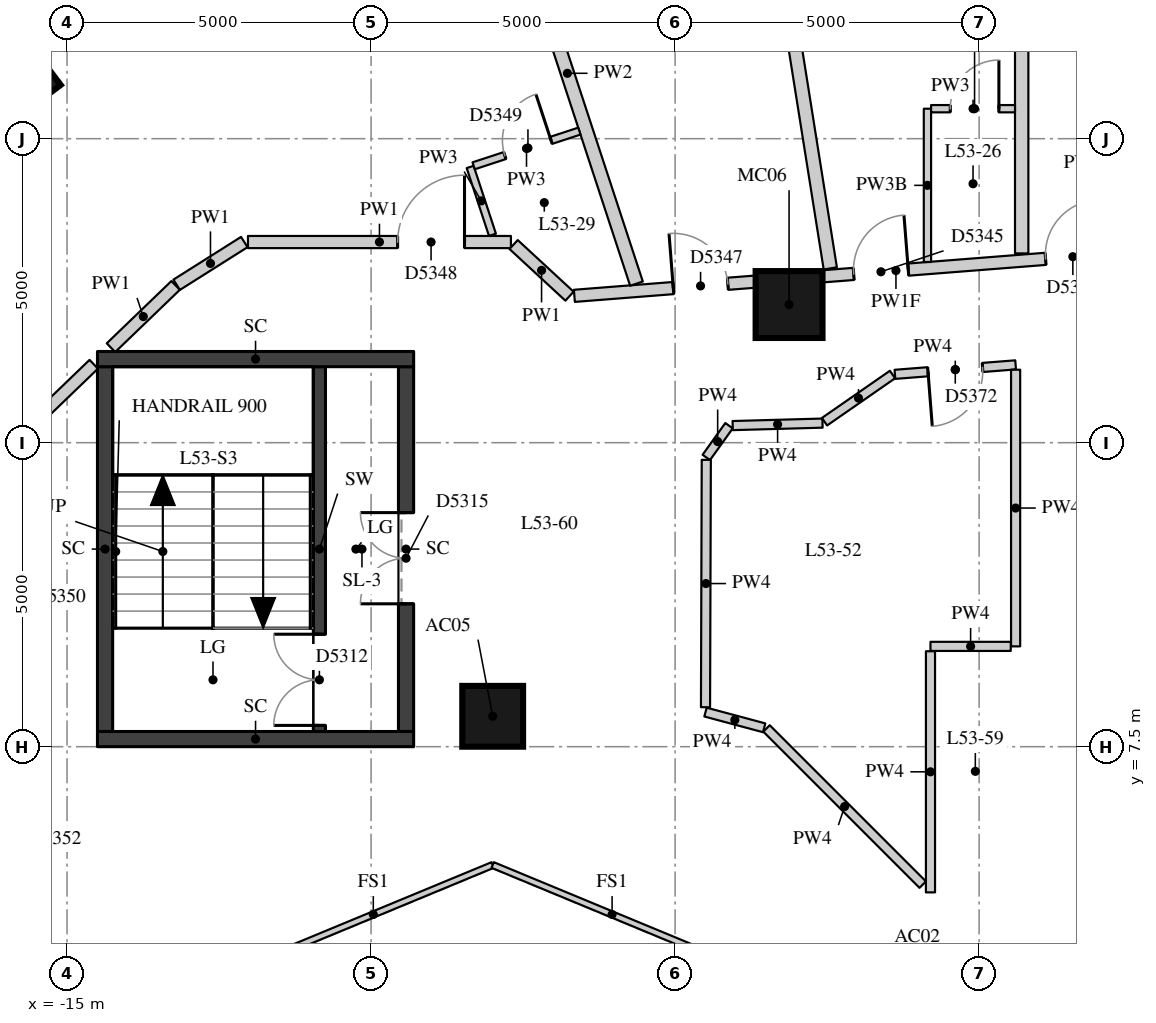
"""IFC4 building model, lengths in metres.
Left out: names, types, materials, properties, quantities, classifications, styles, units other than length and angle.
Written with IfcOpenShell. Run it as: python <this file> out.ifc"""

import sys

from ifc_helpers import new_model, si_unit, direction, frame, frame_2d, origin, origin_2d, place, context, subcontext, project, spatial, rectangle, extrude, element, fill, save


model = new_model("IFC4")
c1 = context("Model", 3, precision=1e-05, world=origin(), true_north=direction((0.0, 1.0)))
c2 = subcontext(c1, "Body", "Model", "MODEL_VIEW")
j1 = project(units=[si_unit("LENGTHUNIT", "METRE"), si_unit("PLANEANGLEUNIT", "RADIAN")], contexts=[c1])
p1 = place(None, origin())
s1 = spatial("IfcSite", under=j1, at=p1, CompositionType="ELEMENT")
p2 = place(p1, origin())
s2 = spatial("IfcBuilding", under=s1, at=p2, CompositionType="ELEMENT")
p3 = place(p2, frame((0.0, 0.0, 189.2)))
s3 = spatial("IfcBuildingStorey", under=s2, at=p3, CompositionType="ELEMENT", Elevation=189.2)
p4 = place(p3, frame((-15.916, 18.71, 0.0), z_axis=(0.0, 0.0, 1.0), x_axis=(-0.60360770772, 0.797281465469, 0.0)))
e1 = element("IfcColumn", 1, at=p4, inside=s3, PredefinedType="COLUMN", context=c2, shape_type="SweptSolid", body=[
    extrude(rectangle(XDim=1.5, YDim=0.9, at=origin_2d()), origin(), (0.0, 0.0, 1.0), 3.3),
])
p5 = place(p3, frame((-8.0, 8.0, 0.0), z_axis=(0.0, 0.0, 1.0), x_axis=(1.0, 0.0, 0.0)))
e2 = element("IfcColumn", 2, at=p5, inside=s3, PredefinedType="COLUMN", context=c2, shape_type="SweptSolid", body=[
    extrude(rectangle(XDim=1.0, YDim=1.0, at=origin_2d()), origin(), (0.0, 0.0, 1.0), 3.3),
])
p6 = place(p3, frame((-3.126, 14.772, 0.0), z_axis=(0.0, 0.0, 1.0), x_axis=(1.0, 0.0, 0.0)))
e3 = element("IfcColumn", 3, at=p6, inside=s3, PredefinedType="COLUMN", context=c2, shape_type="SweptSolid", body=[
    extrude(rectangle(XDim=1.1, YDim=1.1, at=origin_2d()), origin(), (0.0, 0.0, 1.0), 3.3),
])
p7 = place(p3, frame((-10.85, 7.75, 0.0), z_axis=(0.0, 0.0, 1.0), x_axis=(0.0, 1.0, 0.0)))
e4 = element("IfcWall", 4, at=p7, inside=s3, PredefinedType="SHEAR", context=c2, shape_type="SweptSolid", body=[
    extrude(rectangle(XDim=6.0, YDim=0.2, at=frame_2d((3.0, 0.0))), origin(), (0.0, 0.0, 1.0), 3.02),
])
p8 = place(p7, frame((0.1, 0.0, 0.0)))
e5 = element("IfcOpeningElement", 5, at=p8, cuts=e4, PredefinedType="OPENING", context=c2, shape_type="SweptSolid", body=[
    extrude(rectangle(XDim=1.5, YDim=2.1, at=frame_2d((0.75, 1.05))), frame((0.0, 0.11, 0.0), z_axis=(0.0, -1.0, 0.0), x_axis=(1.0, 0.0, 0.0)), (0.0, 0.0, 1.0), 0.22),
])
p9 = place(p3, frame((-14.375, 7.75, -0.28), z_axis=(0.0, 0.0, 1.0), x_axis=(0.0, 1.0, 0.0)))
e6 = element("IfcWall", 6, at=p9, inside=s3, PredefinedType="SHEAR", context=c2, shape_type="SweptSolid", body=[
    extrude(rectangle(XDim=6.0, YDim=0.25, at=frame_2d((3.0, 0.0))), origin(), (0.0, 0.0, 1.0), 3.3),
])
p10 = place(p3, frame((-9.425, 7.75, -0.28), z_axis=(0.0, 0.0, 1.0), x_axis=(0.0, 1.0, 0.0)))
e7 = element("IfcWall", 7, at=p10, inside=s3, PredefinedType="SHEAR", context=c2, shape_type="SweptSolid", body=[
    extrude(rectangle(XDim=6.0, YDim=0.25, at=frame_2d((3.0, 0.0))), origin(), (0.0, 0.0, 1.0), 3.3),
])
p11 = place(p10, frame((2.1, 0.0, 0.28)))
e8 = element("IfcOpeningElement", 8, at=p11, cuts=e7, PredefinedType="OPENING", context=c2, shape_type="SweptSolid", body=[
    extrude(rectangle(XDim=1.5, YDim=2.1, at=frame_2d((0.75, 1.05))), frame((0.0, 0.135, 0.0), z_axis=(0.0, -1.0, 0.0), x_axis=(1.0, 0.0, 0.0)), (0.0, 0.0, 1.0), 0.27),
])
for number, where, z_axis, x_axis in (
    (9, (-14.5, 13.875, -0.28), (0.0, 0.0, 1.0), (1.0, 0.0, 0.0)),
    (10, (-14.5, 7.625, -0.28), (0.0, 0.0, 1.0), (1.0, 0.0, 0.0)),
):
    element("IfcWall", number, at=place(p3, frame(where, z_axis=z_axis, x_axis=x_axis)), inside=s3, PredefinedType="SHEAR", context=c2, shape_type="SweptSolid", body=[
        extrude(rectangle(XDim=5.2, YDim=0.25, at=frame_2d((2.6, 0.0))), origin(), (0.0, 0.0, 1.0), 3.3),
    ])
p12 = place(p3, frame((-16.257, 12.157, 0.0), z_axis=(0.0, 0.0, 1.0), x_axis=(0.720356671174, 0.693603825174, 0.0)))
e11 = element("IfcWall", 11, at=p12, inside=s3, PredefinedType="PARTITIONING", context=c2, shape_type="SweptSolid", body=[
    extrude(rectangle(XDim=2.354, YDim=0.2, at=frame_2d((1.177, 0.0))), origin(), (0.0, 0.0, 1.0), 3.02),
])
p13 = place(p3, frame((-14.278, 14.062, 0.0), z_axis=(0.0, 0.0, 1.0), x_axis=(0.720213092954, 0.693752910435, 0.0)))
e12 = element("IfcWall", 12, at=p13, inside=s3, PredefinedType="PARTITIONING", context=c2, shape_type="SweptSolid", body=[
    extrude(rectangle(XDim=1.476, YDim=0.2, at=frame_2d((0.738, 0.0))), origin(), (0.0, 0.0, 1.0), 3.02),
])
p14 = place(p3, frame((-13.198, 15.097, 0.0), z_axis=(0.0, 0.0, 1.0), x_axis=(0.845466863805, 0.534027885234, 0.0)))
e13 = element("IfcWall", 13, at=p14, inside=s3, PredefinedType="PARTITIONING", context=c2, shape_type="SweptSolid", body=[
    extrude(rectangle(XDim=1.316, YDim=0.2, at=frame_2d((0.658, 0.0))), origin(), (0.0, 0.0, 1.0), 3.02),
])
p15 = place(p3, frame((-12.025, 15.8, 0.0), z_axis=(0.0, 0.0, 1.0), x_axis=(1.0, 0.0, 0.0)))
e14 = element("IfcWall", 14, at=p15, inside=s3, PredefinedType="PARTITIONING", context=c2, shape_type="SweptSolid", body=[
    extrude(rectangle(XDim=4.325, YDim=0.2, at=frame_2d((2.163, 0.0))), origin(), (0.0, 0.0, 1.0), 3.02),
])
p16 = place(p15, frame((2.461, 0.0, 0.0)))
e15 = element("IfcOpeningElement", 15, at=p16, cuts=e14, PredefinedType="OPENING", context=c2, shape_type="SweptSolid", body=[
    extrude(rectangle(XDim=1.1, YDim=2.1, at=frame_2d((0.55, 1.05))), frame((0.0, 0.11, 0.0), z_axis=(0.0, -1.0, 0.0), x_axis=(1.0, 0.0, 0.0)), (0.0, 0.0, 1.0), 0.22),
])
p17 = place(p3, frame((-7.656, 15.759, 0.0), z_axis=(0.0, 0.0, 1.0), x_axis=(0.734444455547, -0.678668801196, 0.0)))
e16 = element("IfcWall", 16, at=p17, inside=s3, PredefinedType="PARTITIONING", context=c2, shape_type="SweptSolid", body=[
    extrude(rectangle(XDim=1.252, YDim=0.2, at=frame_2d((0.626, 0.0))), origin(), (0.0, 0.0, 1.0), 3.02),
])
p18 = place(p3, frame((-6.656, 14.915, 0.0), z_axis=(0.0, 0.0, 1.0), x_axis=(0.99693112817, 0.07828362335, 0.0)))
e17 = element("IfcWall", 17, at=p18, inside=s3, PredefinedType="PARTITIONING", context=c2, shape_type="SweptSolid", body=[
    extrude(rectangle(XDim=10.61, YDim=0.2, at=frame_2d((5.305, 0.0))), origin(), (0.0, 0.0, 1.0), 2.42),
])
p19 = place(p18, frame((7.773, 0.0, 0.0)))
e18 = element("IfcOpeningElement", 18, at=p19, cuts=e17, PredefinedType="OPENING", context=c2, shape_type="SweptSolid", body=[
    extrude(rectangle(XDim=0.9, YDim=2.1, at=frame_2d((0.45, 1.05))), frame((0.0, 0.11, 0.0), z_axis=(0.0, -1.0, 0.0), x_axis=(1.0, 0.0, 0.0)), (0.0, 0.0, 1.0), 0.22),
])
p20 = place(p18, frame((4.608, 0.0, 0.0)))
e19 = element("IfcOpeningElement", 19, at=p20, cuts=e17, PredefinedType="OPENING", context=c2, shape_type="SweptSolid", body=[
    extrude(rectangle(XDim=0.9, YDim=2.1, at=frame_2d((0.45, 1.05))), frame((0.0, 0.11, 0.0), z_axis=(0.0, -1.0, 0.0), x_axis=(1.0, 0.0, 0.0)), (0.0, 0.0, 1.0), 0.22),
])
p21 = place(p18, frame((1.632, 0.0, 0.0)))
e20 = element("IfcOpeningElement", 20, at=p21, cuts=e17, PredefinedType="OPENING", context=c2, shape_type="SweptSolid", body=[
    extrude(rectangle(XDim=0.9, YDim=2.1, at=frame_2d((0.45, 1.05))), frame((0.0, 0.11, 0.0), z_axis=(0.0, -1.0, 0.0), x_axis=(1.0, 0.0, 0.0)), (0.0, 0.0, 1.0), 0.22),
])
p22 = place(p3, frame((-4.487, 12.258, 0.0), z_axis=(0.0, 0.0, 1.0), x_axis=(0.582280364551, 0.812988054684, 0.0)))
e21 = element("IfcWall", 21, at=p22, inside=s3, PredefinedType="PARTITIONING", context=c2, shape_type="SweptSolid", body=[
    extrude(rectangle(XDim=0.642, YDim=0.15, at=frame_2d((0.321, 0.0))), origin(), (0.0, 0.0, 1.0), 3.02),
])
p23 = place(p3, frame((-4.053, 12.781, 0.0), z_axis=(0.0, 0.0, 1.0), x_axis=(0.999619372091, 0.027588239157, 0.0)))
e22 = element("IfcWall", 22, at=p23, inside=s3, PredefinedType="PARTITIONING", context=c2, shape_type="SweptSolid", body=[
    extrude(rectangle(XDim=1.478, YDim=0.15, at=frame_2d((0.739, 0.0))), origin(), (0.0, 0.0, 1.0), 3.02),
])
p24 = place(p3, frame((-2.543, 12.845, 0.0), z_axis=(0.0, 0.0, 1.0), x_axis=(0.821558970312, 0.570123546523, 0.0)))
e23 = element("IfcWall", 23, at=p24, inside=s3, PredefinedType="PARTITIONING", context=c2, shape_type="SweptSolid", body=[
    extrude(rectangle(XDim=1.361, YDim=0.15, at=frame_2d((0.681, 0.0))), origin(), (0.0, 0.0, 1.0), 3.02),
])
p25 = place(p3, frame((-1.385, 13.624, 0.0), z_axis=(0.0, 0.0, 1.0), x_axis=(0.996924678821, 0.078365711621, 0.0)))
e24 = element("IfcWall", 24, at=p25, inside=s3, PredefinedType="PARTITIONING", context=c2, shape_type="SweptSolid", body=[
    extrude(rectangle(XDim=1.991, YDim=0.15, at=frame_2d((0.995, 0.0))), origin(), (0.0, 0.0, 1.0), 3.02),
])
p26 = place(p25, frame((0.545, 0.0, 0.0)))
e25 = element("IfcOpeningElement", 25, at=p26, cuts=e24, PredefinedType="OPENING", context=c2, shape_type="SweptSolid", body=[
    extrude(rectangle(XDim=0.9, YDim=2.1, at=frame_2d((0.45, 1.05))), frame((0.0, 0.085, 0.0), z_axis=(0.0, -1.0, 0.0), x_axis=(1.0, 0.0, 0.0)), (0.0, 0.0, 1.0), 0.17),
])
p27 = place(p3, frame((0.6, 13.7, 0.0), z_axis=(0.0, 0.0, 1.0), x_axis=(0.0, -1.0, 0.0)))
e26 = element("IfcWall", 26, at=p27, inside=s3, PredefinedType="PARTITIONING", context=c2, shape_type="SweptSolid", body=[
    extrude(rectangle(XDim=4.55, YDim=0.15, at=frame_2d((2.275, 0.0))), origin(), (0.0, 0.0, 1.0), 3.02),
])
p28 = place(p3, frame((0.52, 9.15, 0.0), z_axis=(0.0, 0.0, 1.0), x_axis=(-1.0, 0.0, 0.0)))
e27 = element("IfcWall", 27, at=p28, inside=s3, PredefinedType="PARTITIONING", context=c2, shape_type="SweptSolid", body=[
    extrude(rectangle(XDim=1.32, YDim=0.15, at=frame_2d((0.66, 0.0))), origin(), (0.0, 0.0, 1.0), 3.02),
])
p29 = place(p3, frame((-0.8, 9.07, 0.0), z_axis=(0.0, 0.0, 1.0), x_axis=(0.0, -1.0, 0.0)))
e28 = element("IfcWall", 28, at=p29, inside=s3, PredefinedType="PARTITIONING", context=c2, shape_type="SweptSolid", body=[
    extrude(rectangle(XDim=3.966, YDim=0.15, at=frame_2d((1.983, 0.0))), origin(), (0.0, 0.0, 1.0), 3.02),
])
p30 = place(p3, frame((-0.927, 5.231, 0.0), z_axis=(0.0, 0.0, 1.0), x_axis=(-0.707106781187, 0.707106781187, 0.0)))
e29 = element("IfcWall", 29, at=p30, inside=s3, PredefinedType="PARTITIONING", context=c2, shape_type="SweptSolid", body=[
    extrude(rectangle(XDim=3.633, YDim=0.15, at=frame_2d((1.817, 0.0))), origin(), (0.0, 0.0, 1.0), 3.02),
])
p31 = place(p3, frame((-3.535, 7.811, 0.0), z_axis=(0.0, 0.0, 1.0), x_axis=(-0.965921867197, 0.258833820183, 0.0)))
e30 = element("IfcWall", 30, at=p31, inside=s3, PredefinedType="PARTITIONING", context=c2, shape_type="SweptSolid", body=[
    extrude(rectangle(XDim=0.999, YDim=0.15, at=frame_2d((0.5, 0.0))), origin(), (0.0, 0.0, 1.0), 3.02),
])
p32 = place(p3, frame((-4.5, 8.149, 0.0), z_axis=(0.0, 0.0, 1.0), x_axis=(0.003180492795, 0.99999494222, 0.0)))
e31 = element("IfcWall", 31, at=p32, inside=s3, PredefinedType="PARTITIONING", context=c2, shape_type="SweptSolid", body=[
    extrude(rectangle(XDim=4.068, YDim=0.15, at=frame_2d((2.034, 0.0))), origin(), (0.0, 0.0, 1.0), 3.02),
])
p33 = place(p3, frame((0.7, 23.4, 0.0), z_axis=(0.0, 0.0, 1.0), x_axis=(0.0, -1.0, 0.0)))
e32 = element("IfcWall", 32, at=p33, inside=s3, PredefinedType="PARTITIONING", context=c2, shape_type="SweptSolid", body=[
    extrude(rectangle(XDim=7.787, YDim=0.22, at=frame_2d((3.893, 0.0))), origin(), (0.0, 0.0, 1.0), 2.47),
])
p34 = place(p3, frame((-3.671, 23.056, 0.0), z_axis=(0.0, 0.0, 1.0), x_axis=(0.157087942897, -0.987584618246, 0.0)))
e33 = element("IfcWall", 33, at=p34, inside=s3, PredefinedType="PARTITIONING", context=c2, shape_type="SweptSolid", body=[
    extrude(rectangle(XDim=7.786, YDim=0.22, at=frame_2d((3.893, 0.0))), origin(), (0.0, 0.0, 1.0), 2.47),
])
p35 = place(p3, frame((-7.907, 22.035, 0.0), z_axis=(0.0, 0.0, 1.0), x_axis=(0.311980831408, -0.950088396326, 0.0)))
e34 = element("IfcWall", 34, at=p35, inside=s3, PredefinedType="PARTITIONING", context=c2, shape_type="SweptSolid", body=[
    extrude(rectangle(XDim=7.283, YDim=0.22, at=frame_2d((3.642, 0.0))), origin(), (0.0, 0.0, 1.0), 3.02),
])
p36 = place(p3, frame((-0.85, 15.472, 0.0), z_axis=(0.0, 0.0, 1.0), x_axis=(0.0, 1.0, 0.0)))
e35 = element("IfcWall", 35, at=p36, inside=s3, PredefinedType="PARTITIONING", context=c2, shape_type="SweptSolid", body=[
    extrude(rectangle(XDim=2.521, YDim=0.12, at=frame_2d((1.261, 0.0))), origin(), (0.0, 0.0, 1.0), 2.47),
])
p37 = place(p3, frame((-8.004, 15.919, 0.0), z_axis=(0.0, 0.0, 1.0), x_axis=(-0.31198444573, 0.950087209483, 0.0)))
e36 = element("IfcWall", 36, at=p37, inside=s3, PredefinedType="PARTITIONING", context=c2, shape_type="SweptSolid", body=[
    extrude(rectangle(XDim=1.175, YDim=0.12, at=frame_2d((0.587, 0.0))), origin(), (0.0, 0.0, 1.0), 3.02),
])
p38 = place(p3, frame((-0.79, 17.993, 0.0), z_axis=(0.0, 0.0, 1.0), x_axis=(1.0, 0.0, 0.0)))
e37 = element("IfcWall", 37, at=p38, inside=s3, PredefinedType="PARTITIONING", context=c2, shape_type="SweptSolid", body=[
    extrude(rectangle(XDim=1.38, YDim=0.12, at=frame_2d((0.69, 0.0))), origin(), (0.0, 0.0, 1.0), 3.02),
])
p39 = place(p38, frame((0.315, 0.0, 0.0)))
e38 = element("IfcOpeningElement", 38, at=p39, cuts=e37, PredefinedType="OPENING", context=c2, shape_type="SweptSolid", body=[
    extrude(rectangle(XDim=0.8, YDim=2.1, at=frame_2d((0.4, 1.05))), frame((0.0, 0.07, 0.0), z_axis=(0.0, -1.0, 0.0), x_axis=(1.0, 0.0, 0.0)), (0.0, 0.0, 1.0), 0.14),
])
p40 = place(p3, frame((-8.313, 17.054, 0.0), z_axis=(0.0, 0.0, 1.0), x_axis=(0.950153758954, 0.311781709446, 0.0)))
e39 = element("IfcWall", 39, at=p40, inside=s3, PredefinedType="PARTITIONING", context=c2, shape_type="SweptSolid", body=[
    extrude(rectangle(XDim=1.83, YDim=0.12, at=frame_2d((0.915, 0.0))), origin(), (0.0, 0.0, 1.0), 3.02),
])
p41 = place(p40, frame((0.54, 0.0, 0.0)))
e40 = element("IfcOpeningElement", 40, at=p41, cuts=e39, PredefinedType="OPENING", context=c2, shape_type="SweptSolid", body=[
    extrude(rectangle(XDim=0.8, YDim=2.1, at=frame_2d((0.4, 1.05))), frame((0.0, 0.07, 0.0), z_axis=(0.0, -1.0, 0.0), x_axis=(1.0, 0.0, 0.0)), (0.0, 0.0, 1.0), 0.14),
])
for number, where, z_axis, x_axis in (
    (41, (-11.927, 3.927, 0.0), (0.0, 0.0, 1.0), (0.924, 0.383, 0.0)),
    (42, (-8.0, 5.554, 0.0), (0.0, 0.0, 1.0), (0.924, -0.383, 0.0)),
):
    element("IfcWall", number, at=place(p3, frame(where, z_axis=z_axis, x_axis=x_axis)), inside=s3, PredefinedType="PARTITIONING", context=c2, shape_type="SweptSolid", body=[
        extrude(rectangle(XDim=4.251, YDim=0.1, at=frame_2d((2.125, 0.0))), origin(), (0.0, 0.0, 1.0), 3.02),
    ])
p42 = place(p8, origin())
e43 = element("IfcDoor", 43, at=p42, inside=s3, OperationType="DOUBLE_DOOR_SINGLE_SWING", PredefinedType="DOOR", context=c2, shape_type="SweptSolid", body=[
    extrude(rectangle(XDim=1.5, YDim=2.1, at=frame_2d((0.75, 1.05))), frame((0.0, 0.025, 0.0), z_axis=(0.0, -1.0, 0.0), x_axis=(1.0, 0.0, 0.0)), (0.0, 0.0, 1.0), 0.05),
])
fill(e5, e43)
p43 = place(p11, origin())
e44 = element("IfcDoor", 44, at=p43, inside=s3, OperationType="DOUBLE_DOOR_SINGLE_SWING", PredefinedType="DOOR", context=c2, shape_type="SweptSolid", body=[
    extrude(rectangle(XDim=1.5, YDim=2.1, at=frame_2d((0.75, 1.05))), frame((0.0, 0.025, 0.0), z_axis=(0.0, -1.0, 0.0), x_axis=(1.0, 0.0, 0.0)), (0.0, 0.0, 1.0), 0.05),
])
fill(e8, e44)
p44 = place(p19, origin())
e45 = element("IfcDoor", 45, at=p44, inside=s3, OperationType="SINGLE_SWING_RIGHT", PredefinedType="DOOR", context=c2, shape_type="SweptSolid", body=[
    extrude(rectangle(XDim=0.9, YDim=2.1, at=frame_2d((0.45, 1.05))), frame((0.0, 0.025, 0.0), z_axis=(0.0, -1.0, 0.0), x_axis=(1.0, 0.0, 0.0)), (0.0, 0.0, 1.0), 0.05),
])
fill(e18, e45)
p45 = place(p20, origin())
e46 = element("IfcDoor", 46, at=p45, inside=s3, OperationType="SINGLE_SWING_RIGHT", PredefinedType="DOOR", context=c2, shape_type="SweptSolid", body=[
    extrude(rectangle(XDim=0.9, YDim=2.1, at=frame_2d((0.45, 1.05))), frame((0.0, 0.025, 0.0), z_axis=(0.0, -1.0, 0.0), x_axis=(1.0, 0.0, 0.0)), (0.0, 0.0, 1.0), 0.05),
])
fill(e19, e46)
p46 = place(p39, origin())
e47 = element("IfcDoor", 47, at=p46, inside=s3, OperationType="SINGLE_SWING_RIGHT", PredefinedType="DOOR", context=c2, shape_type="SweptSolid", body=[
    extrude(rectangle(XDim=0.8, YDim=2.1, at=frame_2d((0.4, 1.05))), frame((0.0, 0.025, 0.0), z_axis=(0.0, -1.0, 0.0), x_axis=(1.0, 0.0, 0.0)), (0.0, 0.0, 1.0), 0.05),
])
fill(e38, e47)
p47 = place(p21, origin())
e48 = element("IfcDoor", 48, at=p47, inside=s3, OperationType="SINGLE_SWING_LEFT", PredefinedType="DOOR", context=c2, shape_type="SweptSolid", body=[
    extrude(rectangle(XDim=0.9, YDim=2.1, at=frame_2d((0.45, 1.05))), frame((0.0, 0.025, 0.0), z_axis=(0.0, -1.0, 0.0), x_axis=(1.0, 0.0, 0.0)), (0.0, 0.0, 1.0), 0.05),
])
fill(e20, e48)
p48 = place(p16, origin())
e49 = element("IfcDoor", 49, at=p48, inside=s3, OperationType="SINGLE_SWING_RIGHT", PredefinedType="DOOR", context=c2, shape_type="SweptSolid", body=[
    extrude(rectangle(XDim=1.1, YDim=2.1, at=frame_2d((0.55, 1.05))), frame((0.0, 0.025, 0.0), z_axis=(0.0, -1.0, 0.0), x_axis=(1.0, 0.0, 0.0)), (0.0, 0.0, 1.0), 0.05),
])
fill(e15, e49)
p49 = place(p41, origin())
e50 = element("IfcDoor", 50, at=p49, inside=s3, OperationType="SINGLE_SWING_RIGHT", PredefinedType="DOOR", context=c2, shape_type="SweptSolid", body=[
    extrude(rectangle(XDim=0.8, YDim=2.1, at=frame_2d((0.4, 1.05))), frame((0.0, 0.025, 0.0), z_axis=(0.0, -1.0, 0.0), x_axis=(1.0, 0.0, 0.0)), (0.0, 0.0, 1.0), 0.05),
])
fill(e40, e50)
p50 = place(p26, origin())
e51 = element("IfcDoor", 51, at=p50, inside=s3, OperationType="SINGLE_SWING_RIGHT", PredefinedType="DOOR", context=c2, shape_type="SweptSolid", body=[
    extrude(rectangle(XDim=0.9, YDim=2.1, at=frame_2d((0.45, 1.05))), frame((0.0, 0.025, 0.0), z_axis=(0.0, -1.0, 0.0), x_axis=(1.0, 0.0, 0.0)), (0.0, 0.0, 1.0), 0.05),
])
fill(e25, e51)
save(model, sys.argv[1])
